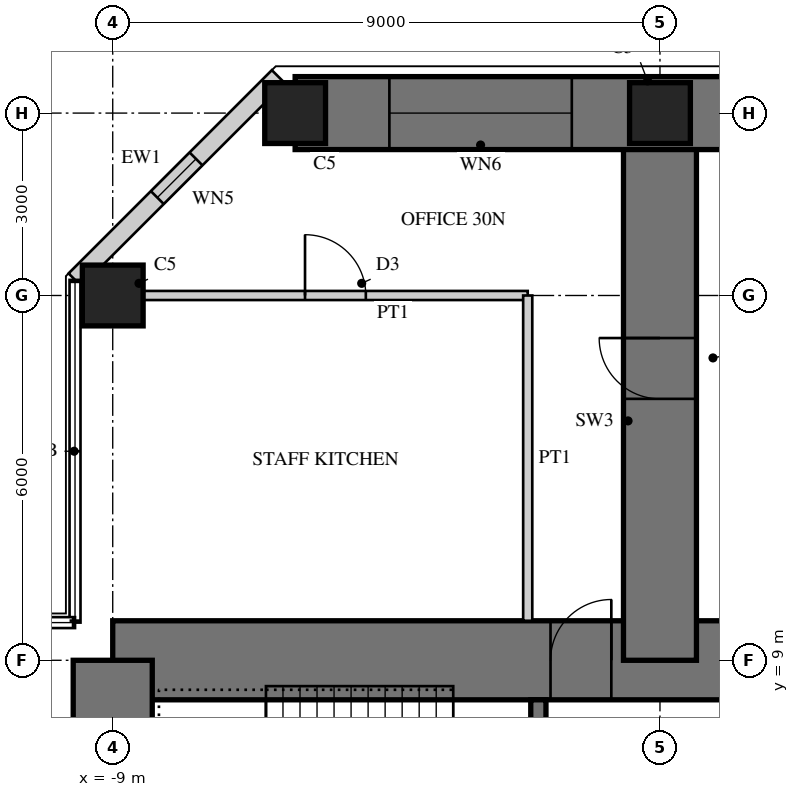
"""IFC4 building model, lengths in metres.
Left out: names, types, materials, properties, quantities, classifications, styles, units other than length and angle.
Written with IfcOpenShell. Run it as: python <this file> out.ifc"""

import sys

from ifc_helpers import new_model, si_unit, direction, frame, frame_2d, origin, origin_2d, place, context, subcontext, project, spatial, rectangle, hollow_rectangle, extrude, element, fill, save


model = new_model("IFC4")
c1 = context("Model", 3, precision=1e-05, world=origin(), true_north=direction((0.0, 1.0)))
c2 = subcontext(c1, "Body", "Model", "MODEL_VIEW")
j1 = project(units=[si_unit("LENGTHUNIT", "METRE"), si_unit("PLANEANGLEUNIT", "RADIAN")], contexts=[c1])
p1 = place(None, origin())
s1 = spatial("IfcSite", under=j1, at=p1, CompositionType="ELEMENT")
p2 = place(p1, origin())
s2 = spatial("IfcBuilding", under=s1, at=p2, CompositionType="ELEMENT")
p3 = place(p2, frame((0.0, 0.0, 124.5)))
s3 = spatial("IfcBuildingStorey", under=s2, at=p3, CompositionType="ELEMENT", Elevation=124.5)
p4 = place(p3, frame((9.0, 9.0, 0.0), z_axis=(0.0, 0.0, 1.0), x_axis=(-1.0, 0.0, 0.0)))
e1 = element("IfcWall", 1, at=p4, inside=s3, PredefinedType="SHEAR", context=c2, shape_type="SweptSolid", body=[
    extrude(rectangle(XDim=18.0, YDim=1.3, at=frame_2d((9.0, 0.0))), origin(), (0.0, 0.0, 1.0), 4.0),
])
p5 = place(p4, frame((9.8, 0.0, 0.0)))
e2 = element("IfcOpeningElement", 2, at=p5, cuts=e1, PredefinedType="OPENING", context=c2, shape_type="SweptSolid", body=[
    extrude(rectangle(XDim=1.0, YDim=2.4, at=frame_2d((0.5, 1.2))), frame((0.0, 0.66, 0.0), z_axis=(0.0, -1.0, 0.0), x_axis=(1.0, 0.0, 0.0)), (0.0, 0.0, 1.0), 1.32),
])
p6 = place(p3, frame((-9.0, 9.0, 0.0), z_axis=(0.0, 0.0, 1.0), x_axis=(0.0, -1.0, 0.0)))
e3 = element("IfcWall", 3, at=p6, inside=s3, PredefinedType="SHEAR", context=c2, shape_type="SweptSolid", body=[
    extrude(rectangle(XDim=18.0, YDim=1.3, at=frame_2d((9.0, 0.0))), origin(), (0.0, 0.0, 1.0), 4.0),
])
p7 = place(p6, frame((9.8, 0.0, 0.0)))
e4 = element("IfcOpeningElement", 4, at=p7, cuts=e3, PredefinedType="OPENING", context=c2, shape_type="SweptSolid", body=[
    extrude(rectangle(XDim=1.0, YDim=2.4, at=frame_2d((0.5, 1.2))), frame((0.0, 0.66, 0.0), z_axis=(0.0, -1.0, 0.0), x_axis=(1.0, 0.0, 0.0)), (0.0, 0.0, 1.0), 1.32),
])
p8 = place(p3, frame((-2.0, 1.675, 0.0), z_axis=(0.0, 0.0, 1.0), x_axis=(0.0, 1.0, 0.0)))
e5 = element("IfcWall", 5, at=p8, inside=s3, PredefinedType="SHEAR", context=c2, shape_type="SweptSolid", body=[
    extrude(rectangle(XDim=6.675, YDim=0.25, at=frame_2d((3.337, 0.0))), origin(), (0.0, 0.0, 1.0), 4.0),
])
p9 = place(p8, frame((0.725, 0.0, 0.0)))
e6 = element("IfcOpeningElement", 6, at=p9, cuts=e5, PredefinedType="OPENING", context=c2, shape_type="SweptSolid", body=[
    extrude(rectangle(XDim=1.0, YDim=2.1, at=frame_2d((0.5, 1.05))), frame((0.0, 0.135, 0.0), z_axis=(0.0, -1.0, 0.0), x_axis=(1.0, 0.0, 0.0)), (0.0, 0.0, 1.0), 0.27),
])
p10 = place(p3, frame((0.0, 9.0, 0.0), z_axis=(0.0, 0.0, 1.0), x_axis=(0.0, 1.0, 0.0)))
e7 = element("IfcWall", 7, at=p10, inside=s3, PredefinedType="SHEAR", context=c2, shape_type="SweptSolid", body=[
    extrude(rectangle(XDim=9.0, YDim=1.2, at=frame_2d((4.5, 0.0))), origin(), (0.0, 0.0, 1.0), 4.0),
])
p11 = place(p10, frame((4.3, 0.0, 0.0)))
e8 = element("IfcOpeningElement", 8, at=p11, cuts=e7, PredefinedType="OPENING", context=c2, shape_type="SweptSolid", body=[
    extrude(rectangle(XDim=1.0, YDim=2.2, at=frame_2d((0.5, 1.1))), frame((0.0, 0.61, 0.0), z_axis=(0.0, -1.0, 0.0), x_axis=(1.0, 0.0, 0.0)), (0.0, 0.0, 1.0), 1.22),
])
p12 = place(p3, frame((6.0, 18.0, 0.0), z_axis=(0.0, 0.0, 1.0), x_axis=(-1.0, 0.0, 0.0)))
e9 = element("IfcWall", 9, at=p12, inside=s3, PredefinedType="SHEAR", context=c2, shape_type="SweptSolid", body=[
    extrude(rectangle(XDim=12.0, YDim=1.2, at=frame_2d((6.0, 0.0))), origin(), (0.0, 0.0, 1.0), 4.0),
])
p13 = place(p12, frame((1.55, 0.0, 0.6)))
e10 = element("IfcOpeningElement", 10, at=p13, cuts=e9, PredefinedType="OPENING", context=c2, shape_type="SweptSolid", body=[
    extrude(rectangle(XDim=3.0, YDim=2.4, at=frame_2d((1.5, 1.2))), frame((0.0, 0.61, 0.0), z_axis=(0.0, -1.0, 0.0), x_axis=(1.0, 0.0, 0.0)), (0.0, 0.0, 1.0), 1.22),
])
p14 = place(p12, frame((7.45, 0.0, 0.6)))
e11 = element("IfcOpeningElement", 11, at=p14, cuts=e9, PredefinedType="OPENING", context=c2, shape_type="SweptSolid", body=[
    extrude(rectangle(XDim=3.0, YDim=2.4, at=frame_2d((1.5, 1.2))), frame((0.0, 0.61, 0.0), z_axis=(0.0, -1.0, 0.0), x_axis=(1.0, 0.0, 0.0)), (0.0, 0.0, 1.0), 1.22),
])
for number, where, z_axis, x_axis in (
    (12, (-9.0, 15.0, 0.0), (0.0, 0.0, 1.0), (1.0, 0.0, 0.0)),
    (13, (0.0, 18.0, 0.0), (0.0, 0.0, 1.0), (1.0, 0.0, 0.0)),
    (14, (-6.0, 18.0, 0.0), (0.0, 0.0, 1.0), (1.0, 0.0, 0.0)),
):
    element("IfcColumn", number, at=place(p3, frame(where, z_axis=z_axis, x_axis=x_axis)), inside=s3, PredefinedType="COLUMN", context=c2, shape_type="SweptSolid", body=[
        extrude(rectangle(XDim=1.0, YDim=1.0, at=origin_2d()), origin(), (0.0, 0.0, 1.0), 4.0),
    ])
p15 = place(p3, frame((-6.277, 18.6, 0.0), z_axis=(0.0, 0.0, 1.0), x_axis=(-0.707106781187, -0.707106781187, 0.0)))
e15 = element("IfcWall", 15, at=p15, inside=s3, PredefinedType="SOLIDWALL", context=c2, shape_type="SweptSolid", body=[
    extrude(rectangle(XDim=4.728, YDim=0.3, at=frame_2d((2.364, 0.0))), origin(), (0.0, 0.0, 1.0), 3.8),
])
p16 = place(p15, frame((1.914, 0.0, 0.3)))
e16 = element("IfcOpeningElement", 16, at=p16, cuts=e15, PredefinedType="OPENING", context=c2, shape_type="SweptSolid", body=[
    extrude(rectangle(XDim=0.9, YDim=2.4, at=frame_2d((0.45, 1.2))), frame((0.0, 0.16, 0.0), z_axis=(0.0, -1.0, 0.0), x_axis=(1.0, 0.0, 0.0)), (0.0, 0.0, 1.0), 0.32),
])
p17 = place(p3, frame((-2.175, 15.0, 0.0), z_axis=(0.0, 0.0, 1.0), x_axis=(-1.0, 0.0, 0.0)))
e17 = element("IfcWall", 17, at=p17, inside=s3, PredefinedType="PARTITIONING", context=c2, shape_type="SweptSolid", body=[
    extrude(rectangle(XDim=6.325, YDim=0.15, at=frame_2d((3.163, 0.0))), origin(), (0.0, 0.0, 1.0), 3.0),
])
p18 = place(p17, frame((2.663, 0.0, 0.0)))
e18 = element("IfcOpeningElement", 18, at=p18, cuts=e17, PredefinedType="OPENING", context=c2, shape_type="SweptSolid", body=[
    extrude(rectangle(XDim=1.0, YDim=2.1, at=frame_2d((0.5, 1.05))), frame((0.0, 0.085, 0.0), z_axis=(0.0, -1.0, 0.0), x_axis=(1.0, 0.0, 0.0)), (0.0, 0.0, 1.0), 0.17),
])
p19 = place(p3, frame((-2.175, 9.65, 0.0), z_axis=(0.0, 0.0, 1.0), x_axis=(0.0, 1.0, 0.0)))
e19 = element("IfcWall", 19, at=p19, inside=s3, PredefinedType="PARTITIONING", context=c2, shape_type="SweptSolid", body=[
    extrude(rectangle(XDim=5.35, YDim=0.15, at=frame_2d((2.675, 0.0))), origin(), (0.0, 0.0, 1.0), 3.8),
])
p20 = place(p14, origin())
e20 = element("IfcWindow", 20, at=p20, inside=s3, PartitioningType="SINGLE_PANEL", PredefinedType="WINDOW", context=c2, shape_type="SweptSolid", body=[
    extrude(hollow_rectangle(XDim=3.0, YDim=2.4, WallThickness=0.06, at=frame_2d((1.5, 1.2))), frame((0.0, 0.03, 0.0), z_axis=(0.0, -1.0, 0.0), x_axis=(1.0, 0.0, 0.0)), (0.0, 0.0, 1.0), 0.06),
    extrude(rectangle(XDim=2.879, YDim=2.279, at=frame_2d((1.5, 1.2))), frame((0.0, 0.03, 0.0), z_axis=(0.0, -1.0, 0.0), x_axis=(1.0, 0.0, 0.0)), (0.0, 0.0, 1.0), 0.06),
])
fill(e11, e20)
p21 = place(p16, origin())
e21 = element("IfcWindow", 21, at=p21, inside=s3, PartitioningType="SINGLE_PANEL", PredefinedType="WINDOW", context=c2, shape_type="SweptSolid", body=[
    extrude(hollow_rectangle(XDim=0.9, YDim=2.4, WallThickness=0.06, at=frame_2d((0.45, 1.2))), frame((0.0, 0.03, 0.0), z_axis=(0.0, -1.0, 0.0), x_axis=(1.0, 0.0, 0.0)), (0.0, 0.0, 1.0), 0.06),
    extrude(rectangle(XDim=0.779, YDim=2.279, at=frame_2d((0.45, 1.2))), frame((0.0, 0.03, 0.0), z_axis=(0.0, -1.0, 0.0), x_axis=(1.0, 0.0, 0.0)), (0.0, 0.0, 1.0), 0.06),
])
fill(e16, e21)
p22 = place(p18, frame((1.0, 0.0, 0.0), z_axis=(0.0, 0.0, 1.0), x_axis=(-1.0, 0.0, 0.0)))
e22 = element("IfcDoor", 22, at=p22, inside=s3, OperationType="SINGLE_SWING_LEFT", PredefinedType="DOOR", context=c2, shape_type="SweptSolid", body=[
    extrude(rectangle(XDim=1.0, YDim=2.1, at=frame_2d((0.5, 1.05))), frame((0.0, 0.025, 0.0), z_axis=(0.0, -1.0, 0.0), x_axis=(1.0, 0.0, 0.0)), (0.0, 0.0, 1.0), 0.05),
])
fill(e18, e22)
p23 = place(p11, origin())
e23 = element("IfcDoor", 23, at=p23, inside=s3, OperationType="SINGLE_SWING_RIGHT", PredefinedType="DOOR", context=c2, shape_type="SweptSolid", body=[
    extrude(rectangle(XDim=1.0, YDim=2.2, at=frame_2d((0.5, 1.1))), frame((0.0, 0.025, 0.0), z_axis=(0.0, -1.0, 0.0), x_axis=(1.0, 0.0, 0.0)), (0.0, 0.0, 1.0), 0.05),
])
fill(e8, e23)
p24 = place(p5, frame((1.0, 0.0, 0.0), z_axis=(0.0, 0.0, 1.0), x_axis=(-1.0, 0.0, 0.0)))
e24 = element("IfcDoor", 24, at=p24, inside=s3, OperationType="SINGLE_SWING_RIGHT", PredefinedType="DOOR", context=c2, shape_type="SweptSolid", body=[
    extrude(rectangle(XDim=1.0, YDim=2.4, at=frame_2d((0.5, 1.2))), frame((0.0, -0.005, 0.0), z_axis=(0.0, -1.0, 0.0), x_axis=(1.0, 0.0, 0.0)), (0.0, 0.0, 1.0), 0.05),
])
fill(e2, e24)
save(model, sys.argv[1])
